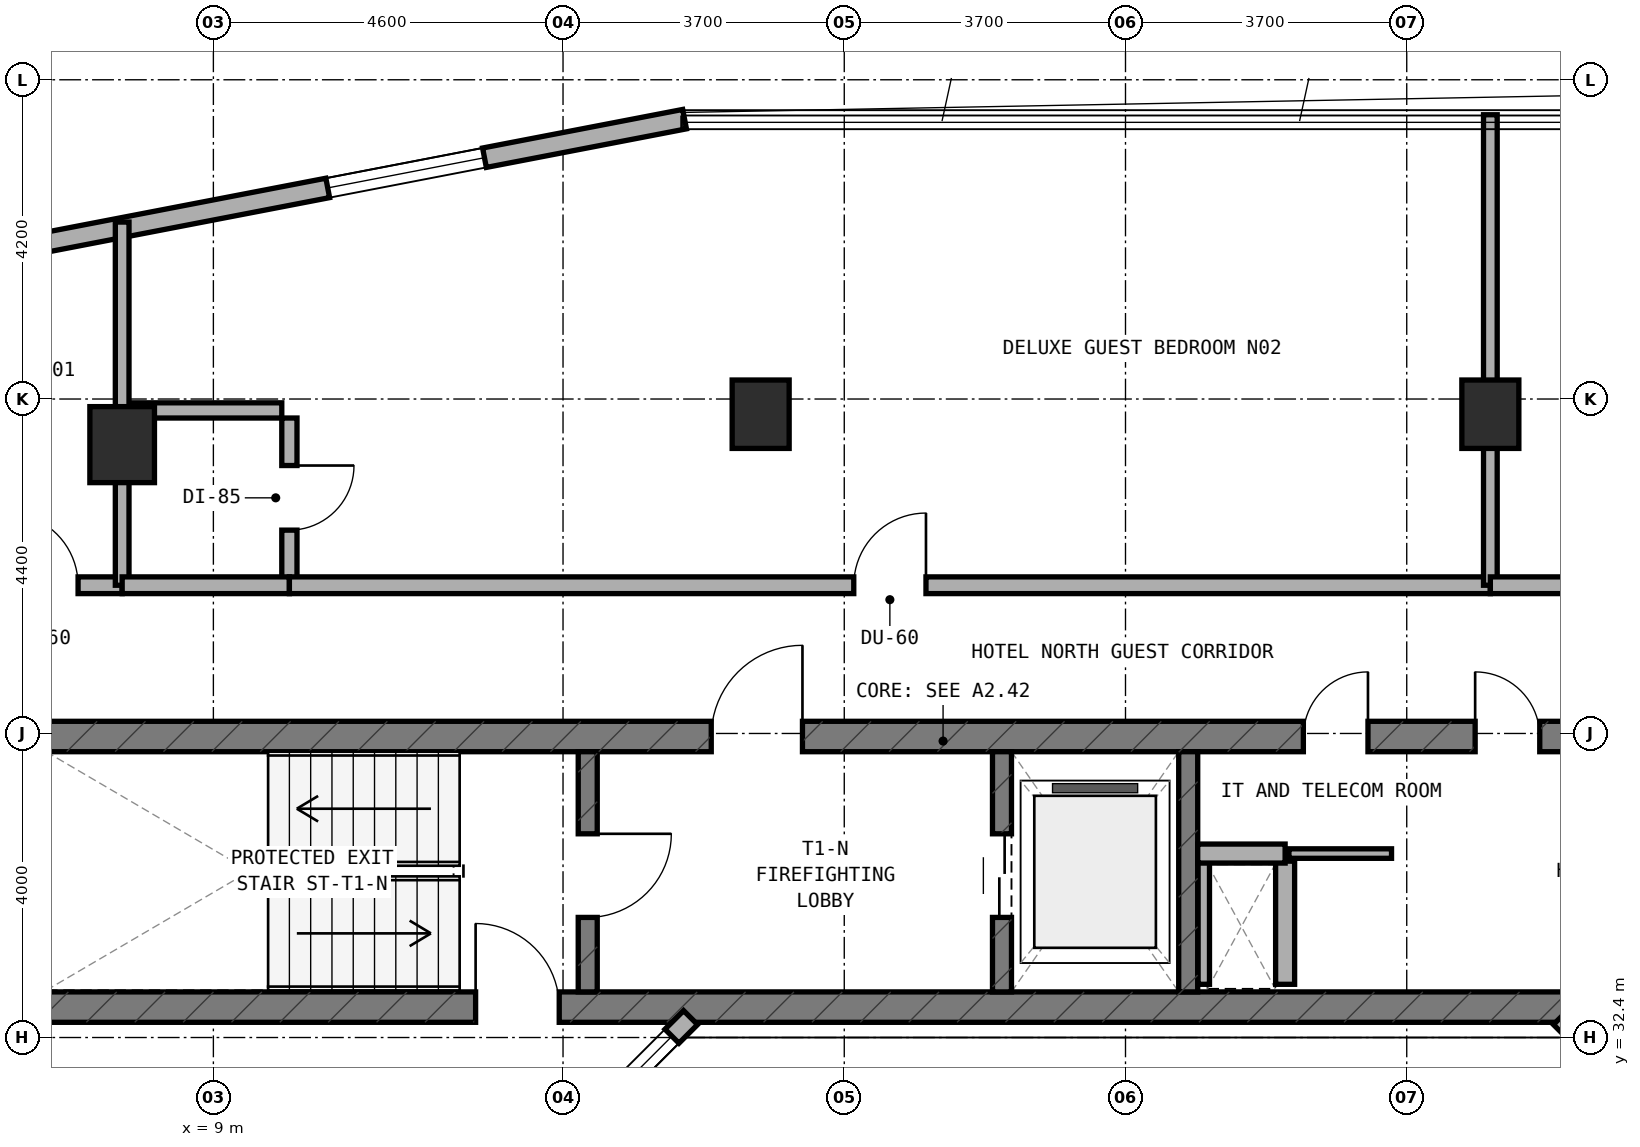
"""IFC4 building model, lengths in metres.
Left out: names, types, materials, properties, quantities, classifications, styles, units other than length and angle.
Written with IfcOpenShell. Run it as: python <this file> out.ifc"""

import sys

from ifc_helpers import new_model, si_unit, direction, frame, frame_2d, origin, origin_2d, place, context, subcontext, project, spatial, rectangle, extrude, element, fill, save


model = new_model("IFC4")
c1 = context("Model", 3, precision=1e-05, world=origin(), true_north=direction((0.0, 1.0)))
c2 = subcontext(c1, "Body", "Model", "MODEL_VIEW")
j1 = project(units=[si_unit("LENGTHUNIT", "METRE"), si_unit("PLANEANGLEUNIT", "RADIAN")], contexts=[c1])
p1 = place(None, origin())
s1 = spatial("IfcSite", under=j1, at=p1, CompositionType="ELEMENT")
p2 = place(p1, origin())
s2 = spatial("IfcBuilding", under=s1, at=p2, CompositionType="ELEMENT")
p3 = place(p2, frame((0.0, 0.0, 191.9)))
s3 = spatial("IfcBuildingStorey", under=s2, at=p3, CompositionType="ELEMENT", Elevation=191.9)
p4 = place(p3, frame((6.4, 32.8, 0.0), z_axis=(0.0, 0.0, 1.0), x_axis=(1.0, 0.0, 0.0)))
e1 = element("IfcWall", 1, at=p4, inside=s3, PredefinedType="SHEAR", context=c2, shape_type="SweptSolid", body=[
    extrude(rectangle(XDim=24.4, YDim=0.4, at=frame_2d((12.2, 0.0))), origin(), (0.0, 0.0, 1.0), 3.6),
])
p5 = place(p4, frame((6.05, 0.0, 0.0)))
e2 = element("IfcOpeningElement", 2, at=p5, cuts=e1, PredefinedType="OPENING", context=c2, shape_type="SweptSolid", body=[
    extrude(rectangle(XDim=1.1, YDim=2.15, at=frame_2d((0.55, 1.075))), frame((0.0, 0.21, 0.0), z_axis=(0.0, -1.0, 0.0), x_axis=(1.0, 0.0, 0.0)), (0.0, 0.0, 1.0), 0.42),
])
p6 = place(p3, frame((6.4, 36.36, 0.0), z_axis=(0.0, 0.0, 1.0), x_axis=(1.0, 0.0, 0.0)))
e3 = element("IfcWall", 3, at=p6, inside=s3, PredefinedType="SHEAR", context=c2, shape_type="SweptSolid", body=[
    extrude(rectangle(XDim=24.4, YDim=0.4, at=frame_2d((12.2, 0.0))), origin(), (0.0, 0.0, 1.0), 3.6),
])
p7 = place(p6, frame((9.15, 0.0, 0.0)))
e4 = element("IfcOpeningElement", 4, at=p7, cuts=e3, PredefinedType="OPENING", context=c2, shape_type="SweptSolid", body=[
    extrude(rectangle(XDim=1.2, YDim=2.15, at=frame_2d((0.6, 1.075))), frame((0.0, 0.21, 0.0), z_axis=(0.0, -1.0, 0.0), x_axis=(1.0, 0.0, 0.0)), (0.0, 0.0, 1.0), 0.42),
])
p8 = place(p6, frame((19.2, 0.0, 0.0)))
e5 = element("IfcOpeningElement", 5, at=p8, cuts=e3, PredefinedType="OPENING", context=c2, shape_type="SweptSolid", body=[
    extrude(rectangle(XDim=0.85, YDim=2.1, at=frame_2d((0.425, 1.05))), frame((0.0, 0.21, 0.0), z_axis=(0.0, -1.0, 0.0), x_axis=(1.0, 0.0, 0.0)), (0.0, 0.0, 1.0), 0.42),
])
p9 = place(p6, frame((16.94, 0.0, 0.0)))
e6 = element("IfcOpeningElement", 6, at=p9, cuts=e3, PredefinedType="OPENING", context=c2, shape_type="SweptSolid", body=[
    extrude(rectangle(XDim=0.85, YDim=2.1, at=frame_2d((0.425, 1.05))), frame((0.0, 0.21, 0.0), z_axis=(0.0, -1.0, 0.0), x_axis=(1.0, 0.0, 0.0)), (0.0, 0.0, 1.0), 0.42),
])
p10 = place(p3, frame((13.925, 33.0, 0.0), z_axis=(0.0, 0.0, 1.0), x_axis=(0.0, 1.0, 0.0)))
e7 = element("IfcWall", 7, at=p10, inside=s3, PredefinedType="STANDARD", context=c2, shape_type="SweptSolid", body=[
    extrude(rectangle(XDim=3.16, YDim=0.25, at=frame_2d((1.58, 0.0))), origin(), (0.0, 0.0, 1.0), 3.32),
])
p11 = place(p10, frame((0.98, 0.0, 0.0)))
e8 = element("IfcOpeningElement", 8, at=p11, cuts=e7, PredefinedType="OPENING", context=c2, shape_type="SweptSolid", body=[
    extrude(rectangle(XDim=1.1, YDim=2.15, at=frame_2d((0.55, 1.075))), frame((0.0, 0.135, 0.0), z_axis=(0.0, -1.0, 0.0), x_axis=(1.0, 0.0, 0.0)), (0.0, 0.0, 1.0), 0.27),
])
p12 = place(p3, frame((19.375, 33.0, 0.0), z_axis=(0.0, 0.0, 1.0), x_axis=(0.0, 1.0, 0.0)))
e9 = element("IfcWall", 9, at=p12, inside=s3, PredefinedType="STANDARD", context=c2, shape_type="SweptSolid", body=[
    extrude(rectangle(XDim=3.16, YDim=0.25, at=frame_2d((1.58, 0.0))), origin(), (0.0, 0.0, 1.0), 3.32),
])
p13 = place(p12, frame((0.98, 0.0, 0.0)))
e10 = element("IfcOpeningElement", 10, at=p13, cuts=e9, PredefinedType="OPENING", context=c2, shape_type="SweptSolid", body=[
    extrude(rectangle(XDim=1.1, YDim=2.15, at=frame_2d((0.55, 1.075))), frame((0.0, 0.135, 0.0), z_axis=(0.0, -1.0, 0.0), x_axis=(1.0, 0.0, 0.0)), (0.0, 0.0, 1.0), 0.27),
])
p14 = place(p3, frame((21.825, 33.0, 0.0), z_axis=(0.0, 0.0, 1.0), x_axis=(0.0, 1.0, 0.0)))
e11 = element("IfcWall", 11, at=p14, inside=s3, PredefinedType="STANDARD", context=c2, shape_type="SweptSolid", body=[
    extrude(rectangle(XDim=3.16, YDim=0.25, at=frame_2d((1.58, 0.0))), origin(), (0.0, 0.0, 1.0), 3.32),
])
for number, where, z_axis, x_axis in (
    (12, (16.2, 40.6, 0.0), (0.0, 0.0, 1.0), (1.0, 0.0, 0.0)),
    (13, (25.8, 40.6, 0.0), (0.0, 0.0, 1.0), (1.0, 0.0, 0.0)),
):
    element("IfcColumn", number, at=place(p3, frame(where, z_axis=z_axis, x_axis=x_axis)), inside=s3, PredefinedType="COLUMN", context=c2, shape_type="SweptSolid", body=[
        extrude(rectangle(XDim=0.75, YDim=0.9, at=origin_2d()), origin(), (0.0, 0.0, 1.0), 3.6),
    ])
p15 = place(p3, frame((7.8, 40.2, 0.0), z_axis=(0.0, 0.0, 1.0), x_axis=(1.0, 0.0, 0.0)))
e14 = element("IfcColumn", 14, at=p15, inside=s3, PredefinedType="COLUMN", context=c2, shape_type="SweptSolid", body=[
    extrude(rectangle(XDim=0.85, YDim=1.0, at=origin_2d()), origin(), (0.0, 0.0, 1.0), 3.6),
])
p16 = place(p3, frame((13.515, 30.899, 0.0), z_axis=(0.0, 0.0, 1.0), x_axis=(0.707106781187, 0.707106781187, 0.0)))
e15 = element("IfcWall", 15, at=p16, inside=s3, PredefinedType="STANDARD", context=c2, shape_type="SweptSolid", body=[
    extrude(rectangle(XDim=2.493, YDim=0.26, at=frame_2d((1.247, 0.0))), origin(), (0.0, 0.0, 1.0), 3.32),
])
p17 = place(p16, frame((0.347, 0.0, 0.85)))
e16 = element("IfcOpeningElement", 16, at=p17, cuts=e15, PredefinedType="OPENING", context=c2, shape_type="SweptSolid", body=[
    extrude(rectangle(XDim=1.8, YDim=1.5, at=frame_2d((0.9, 0.75))), frame((0.0, 0.14, 0.0), z_axis=(0.0, -1.0, 0.0), x_axis=(1.0, 0.0, 0.0)), (0.0, 0.0, 1.0), 0.28),
])
p18 = place(p3, frame((26.722, 32.662, 0.0), z_axis=(0.0, 0.0, 1.0), x_axis=(0.707106781187, -0.707106781187, 0.0)))
e17 = element("IfcWall", 17, at=p18, inside=s3, PredefinedType="STANDARD", context=c2, shape_type="SweptSolid", body=[
    extrude(rectangle(XDim=2.529, YDim=0.26, at=frame_2d((1.264, 0.0))), origin(), (0.0, 0.0, 1.0), 3.32),
])
p19 = place(p18, frame((0.364, 0.0, 0.85)))
e18 = element("IfcOpeningElement", 18, at=p19, cuts=e17, PredefinedType="OPENING", context=c2, shape_type="SweptSolid", body=[
    extrude(rectangle(XDim=1.8, YDim=1.5, at=frame_2d((0.9, 0.75))), frame((0.0, 0.14, 0.0), z_axis=(0.0, -1.0, 0.0), x_axis=(1.0, 0.0, 0.0)), (0.0, 0.0, 1.0), 0.28),
])
p20 = place(p3, frame((15.199, 44.482, 0.0), z_axis=(0.0, 0.0, 1.0), x_axis=(-0.98192801022, -0.189254809039, 0.0)))
e19 = element("IfcWall", 19, at=p20, inside=s3, PredefinedType="STANDARD", context=c2, shape_type="SweptSolid", body=[
    extrude(rectangle(XDim=9.046, YDim=0.26, at=frame_2d((4.523, 0.0))), origin(), (0.0, 0.0, 1.0), 3.32),
])
p21 = place(p20, frame((2.681, 0.0, 0.85)))
e20 = element("IfcOpeningElement", 20, at=p21, cuts=e19, PredefinedType="OPENING", context=c2, shape_type="SweptSolid", body=[
    extrude(rectangle(XDim=2.1, YDim=1.5, at=frame_2d((1.05, 0.75))), frame((0.0, 0.14, 0.0), z_axis=(0.0, -1.0, 0.0), x_axis=(1.0, 0.0, 0.0)), (0.0, 0.0, 1.0), 0.28),
])
p22 = place(p3, frame((22.03, 33.1, 0.0), z_axis=(0.0, 0.0, 1.0), x_axis=(0.0, 1.0, 0.0)))
e21 = element("IfcWall", 21, at=p22, inside=s3, PredefinedType="PARTITIONING", context=c2, shape_type="SweptSolid", body=[
    extrude(rectangle(XDim=1.62, YDim=0.15, at=frame_2d((0.81, 0.0))), origin(), (0.0, 0.0, 1.0), 3.32),
])
p23 = place(p3, frame((23.1, 33.1, 0.0), z_axis=(0.0, 0.0, 1.0), x_axis=(0.0, 1.0, 0.0)))
e22 = element("IfcWall", 22, at=p23, inside=s3, PredefinedType="SOLIDWALL", context=c2, shape_type="SweptSolid", body=[
    extrude(rectangle(XDim=1.62, YDim=0.25, at=frame_2d((0.81, 0.0))), origin(), (0.0, 0.0, 1.0), 3.32),
])
p24 = place(p3, frame((21.95, 34.82, 0.0), z_axis=(0.0, 0.0, 1.0), x_axis=(1.0, 0.0, 0.0)))
e23 = element("IfcWall", 23, at=p24, inside=s3, PredefinedType="SOLIDWALL", context=c2, shape_type="SweptSolid", body=[
    extrude(rectangle(XDim=1.15, YDim=0.25, at=frame_2d((0.575, 0.0))), origin(), (0.0, 0.0, 1.0), 3.32),
])
p25 = place(p3, frame((23.15, 34.82, 0.0), z_axis=(0.0, 0.0, 1.0), x_axis=(1.0, 0.0, 0.0)))
e24 = element("IfcWall", 24, at=p25, inside=s3, PredefinedType="PARTITIONING", context=c2, shape_type="SweptSolid", body=[
    extrude(rectangle(XDim=1.35, YDim=0.125, at=frame_2d((0.675, 0.0))), origin(), (0.0, 0.0, 1.0), 3.32),
])
p26 = place(p3, frame((5.55, 38.35, 0.0), z_axis=(0.0, 0.0, 1.0), x_axis=(1.0, 0.0, 0.0)))
e25 = element("IfcWall", 25, at=p26, inside=s3, PredefinedType="SOLIDWALL", context=c2, shape_type="SweptSolid", body=[
    extrude(rectangle(XDim=2.25, YDim=0.22, at=frame_2d((1.125, 0.0))), origin(), (0.0, 0.0, 1.0), 2.995),
])
p27 = place(p26, frame((0.72, 0.0, 0.0)))
e26 = element("IfcOpeningElement", 26, at=p27, cuts=e25, PredefinedType="OPENING", context=c2, shape_type="SweptSolid", body=[
    extrude(rectangle(XDim=0.95, YDim=2.1, at=frame_2d((0.475, 1.05))), frame((0.0, 0.12, 0.0), z_axis=(0.0, -1.0, 0.0), x_axis=(1.0, 0.0, 0.0)), (0.0, 0.0, 1.0), 0.24),
])
p28 = place(p3, frame((7.8, 38.35, 0.0), z_axis=(0.0, 0.0, 1.0), x_axis=(0.0, 1.0, 0.0)))
e27 = element("IfcWall", 27, at=p28, inside=s3, PredefinedType="SOLIDWALL", context=c2, shape_type="SweptSolid", body=[
    extrude(rectangle(XDim=4.778, YDim=0.18, at=frame_2d((2.389, 0.0))), origin(), (0.0, 0.0, 1.0), 2.935),
])
p29 = place(p3, frame((10.0, 38.45, 0.0), z_axis=(0.0, 0.0, 1.0), x_axis=(0.0, 1.0, 0.0)))
e28 = element("IfcWall", 28, at=p29, inside=s3, PredefinedType="PLUMBINGWALL", context=c2, shape_type="SweptSolid", body=[
    extrude(rectangle(XDim=2.1, YDim=0.2, at=frame_2d((1.05, 0.0))), origin(), (0.0, 0.0, 1.0), 2.935),
])
p30 = place(p29, frame((0.625, 0.0, 0.0)))
e29 = element("IfcOpeningElement", 29, at=p30, cuts=e28, PredefinedType="OPENING", context=c2, shape_type="SweptSolid", body=[
    extrude(rectangle(XDim=0.85, YDim=2.1, at=frame_2d((0.425, 1.05))), frame((0.0, 0.11, 0.0), z_axis=(0.0, -1.0, 0.0), x_axis=(1.0, 0.0, 0.0)), (0.0, 0.0, 1.0), 0.22),
])
p31 = place(p3, frame((7.9, 40.65, 0.0), z_axis=(0.0, 0.0, 1.0), x_axis=(1.0, 0.0, 0.0)))
e30 = element("IfcWall", 30, at=p31, inside=s3, PredefinedType="PLUMBINGWALL", context=c2, shape_type="SweptSolid", body=[
    extrude(rectangle(XDim=2.0, YDim=0.2, at=frame_2d((1.0, 0.0))), origin(), (0.0, 0.0, 1.0), 3.32),
])
p32 = place(p3, frame((7.8, 38.35, 0.0), z_axis=(0.0, 0.0, 1.0), x_axis=(1.0, 0.0, 0.0)))
e31 = element("IfcWall", 31, at=p32, inside=s3, PredefinedType="SOLIDWALL", context=c2, shape_type="SweptSolid", body=[
    extrude(rectangle(XDim=2.2, YDim=0.22, at=frame_2d((1.1, 0.0))), origin(), (0.0, 0.0, 1.0), 2.995),
])
p33 = place(p3, frame((10.0, 38.35, 0.0), z_axis=(0.0, 0.0, 1.0), x_axis=(1.0, 0.0, 0.0)))
e32 = element("IfcWall", 32, at=p33, inside=s3, PredefinedType="SOLIDWALL", context=c2, shape_type="SweptSolid", body=[
    extrude(rectangle(XDim=15.8, YDim=0.22, at=frame_2d((7.9, 0.0))), origin(), (0.0, 0.0, 1.0), 2.995),
])
p34 = place(p33, frame((7.425, 0.0, 0.0)))
e33 = element("IfcOpeningElement", 33, at=p34, cuts=e32, PredefinedType="OPENING", context=c2, shape_type="SweptSolid", body=[
    extrude(rectangle(XDim=0.95, YDim=2.1, at=frame_2d((0.475, 1.05))), frame((0.0, 0.12, 0.0), z_axis=(0.0, -1.0, 0.0), x_axis=(1.0, 0.0, 0.0)), (0.0, 0.0, 1.0), 0.24),
])
p35 = place(p3, frame((25.8, 38.35, 0.0), z_axis=(0.0, 0.0, 1.0), x_axis=(0.0, 1.0, 0.0)))
e34 = element("IfcWall", 34, at=p35, inside=s3, PredefinedType="SOLIDWALL", context=c2, shape_type="SweptSolid", body=[
    extrude(rectangle(XDim=6.19, YDim=0.18, at=frame_2d((3.095, 0.0))), origin(), (0.0, 0.0, 1.0), 2.935),
])
p36 = place(p3, frame((25.8, 38.35, 0.0), z_axis=(0.0, 0.0, 1.0), x_axis=(1.0, 0.0, 0.0)))
e35 = element("IfcWall", 35, at=p36, inside=s3, PredefinedType="SOLIDWALL", context=c2, shape_type="SweptSolid", body=[
    extrude(rectangle(XDim=10.65, YDim=0.22, at=frame_2d((5.325, 0.0))), origin(), (0.0, 0.0, 1.0), 2.935),
])
p37 = place(p36, frame((4.85, 0.0, 0.0)))
e36 = element("IfcOpeningElement", 36, at=p37, cuts=e35, PredefinedType="OPENING", context=c2, shape_type="SweptSolid", body=[
    extrude(rectangle(XDim=0.95, YDim=2.1, at=frame_2d((0.475, 1.05))), frame((0.0, 0.12, 0.0), z_axis=(0.0, -1.0, 0.0), x_axis=(1.0, 0.0, 0.0)), (0.0, 0.0, 1.0), 0.24),
])
p38 = place(p17, origin())
e37 = element("IfcWindow", 37, at=p38, inside=s3, PartitioningType="SINGLE_PANEL", PredefinedType="WINDOW", context=c2, shape_type="SweptSolid", body=[
    extrude(rectangle(XDim=1.8, YDim=1.5, at=frame_2d((0.9, 0.75))), frame((0.0, 0.03, 0.0), z_axis=(0.0, -1.0, 0.0), x_axis=(1.0, 0.0, 0.0)), (0.0, 0.0, 1.0), 0.06),
])
fill(e16, e37)
p39 = place(p21, origin())
e38 = element("IfcWindow", 38, at=p39, inside=s3, PartitioningType="SINGLE_PANEL", PredefinedType="WINDOW", context=c2, shape_type="SweptSolid", body=[
    extrude(rectangle(XDim=2.1, YDim=1.5, at=frame_2d((1.05, 0.75))), frame((0.0, 0.03, 0.0), z_axis=(0.0, -1.0, 0.0), x_axis=(1.0, 0.0, 0.0)), (0.0, 0.0, 1.0), 0.06),
])
fill(e20, e38)
p40 = place(p11, frame((1.1, 0.0, 0.0), z_axis=(0.0, 0.0, 1.0), x_axis=(-1.0, 0.0, 0.0)))
e39 = element("IfcDoor", 39, at=p40, inside=s3, OperationType="SINGLE_SWING_LEFT", PredefinedType="DOOR", context=c2, shape_type="SweptSolid", body=[
    extrude(rectangle(XDim=1.1, YDim=2.15, at=frame_2d((0.55, 1.075))), frame((0.0, 0.025, 0.0), z_axis=(0.0, -1.0, 0.0), x_axis=(1.0, 0.0, 0.0)), (0.0, 0.0, 1.0), 0.05),
])
fill(e8, e39)
p41 = place(p7, origin())
e40 = element("IfcDoor", 40, at=p41, inside=s3, OperationType="SINGLE_SWING_RIGHT", PredefinedType="DOOR", context=c2, shape_type="SweptSolid", body=[
    extrude(rectangle(XDim=1.2, YDim=2.15, at=frame_2d((0.6, 1.075))), frame((0.0, 0.025, 0.0), z_axis=(0.0, -1.0, 0.0), x_axis=(1.0, 0.0, 0.0)), (0.0, 0.0, 1.0), 0.05),
])
fill(e4, e40)
p42 = place(p13, origin())
e41 = element("IfcDoor", 41, at=p42, inside=s3, OperationType="DOUBLE_DOOR_SLIDING", PredefinedType="DOOR", context=c2, shape_type="SweptSolid", body=[
    extrude(rectangle(XDim=1.1, YDim=2.15, at=frame_2d((0.55, 1.075))), frame((0.0, 0.025, 0.0), z_axis=(0.0, -1.0, 0.0), x_axis=(1.0, 0.0, 0.0)), (0.0, 0.0, 1.0), 0.05),
])
fill(e10, e41)
p43 = place(p8, origin())
e42 = element("IfcDoor", 42, at=p43, inside=s3, OperationType="SINGLE_SWING_LEFT", PredefinedType="DOOR", context=c2, shape_type="SweptSolid", body=[
    extrude(rectangle(XDim=0.85, YDim=2.1, at=frame_2d((0.425, 1.05))), frame((0.0, 0.025, 0.0), z_axis=(0.0, -1.0, 0.0), x_axis=(1.0, 0.0, 0.0)), (0.0, 0.0, 1.0), 0.05),
])
fill(e5, e42)
p44 = place(p9, origin())
e43 = element("IfcDoor", 43, at=p44, inside=s3, OperationType="SINGLE_SWING_RIGHT", PredefinedType="DOOR", context=c2, shape_type="SweptSolid", body=[
    extrude(rectangle(XDim=0.85, YDim=2.1, at=frame_2d((0.425, 1.05))), frame((0.0, 0.025, 0.0), z_axis=(0.0, -1.0, 0.0), x_axis=(1.0, 0.0, 0.0)), (0.0, 0.0, 1.0), 0.05),
])
fill(e6, e43)
p45 = place(p5, origin())
e44 = element("IfcDoor", 44, at=p45, inside=s3, OperationType="SINGLE_SWING_LEFT", PredefinedType="DOOR", context=c2, shape_type="SweptSolid", body=[
    extrude(rectangle(XDim=1.1, YDim=2.15, at=frame_2d((0.55, 1.075))), frame((0.0, 0.025, 0.0), z_axis=(0.0, -1.0, 0.0), x_axis=(1.0, 0.0, 0.0)), (0.0, 0.0, 1.0), 0.05),
])
fill(e2, e44)
p46 = place(p27, origin())
e45 = element("IfcDoor", 45, at=p46, inside=s3, OperationType="SINGLE_SWING_LEFT", PredefinedType="DOOR", context=c2, shape_type="SweptSolid", body=[
    extrude(rectangle(XDim=0.95, YDim=2.1, at=frame_2d((0.475, 1.05))), frame((0.0, 0.025, 0.0), z_axis=(0.0, -1.0, 0.0), x_axis=(1.0, 0.0, 0.0)), (0.0, 0.0, 1.0), 0.05),
])
fill(e26, e45)
p47 = place(p30, frame((0.85, 0.0, 0.0), z_axis=(0.0, 0.0, 1.0), x_axis=(-1.0, 0.0, 0.0)))
e46 = element("IfcDoor", 46, at=p47, inside=s3, OperationType="SINGLE_SWING_LEFT", PredefinedType="DOOR", context=c2, shape_type="SweptSolid", body=[
    extrude(rectangle(XDim=0.85, YDim=2.1, at=frame_2d((0.425, 1.05))), frame((0.0, 0.025, 0.0), z_axis=(0.0, -1.0, 0.0), x_axis=(1.0, 0.0, 0.0)), (0.0, 0.0, 1.0), 0.05),
])
fill(e29, e46)
p48 = place(p34, origin())
e47 = element("IfcDoor", 47, at=p48, inside=s3, OperationType="SINGLE_SWING_RIGHT", PredefinedType="DOOR", context=c2, shape_type="SweptSolid", body=[
    extrude(rectangle(XDim=0.95, YDim=2.1, at=frame_2d((0.475, 1.05))), frame((0.0, 0.025, 0.0), z_axis=(0.0, -1.0, 0.0), x_axis=(1.0, 0.0, 0.0)), (0.0, 0.0, 1.0), 0.05),
])
fill(e33, e47)
save(model, sys.argv[1])
